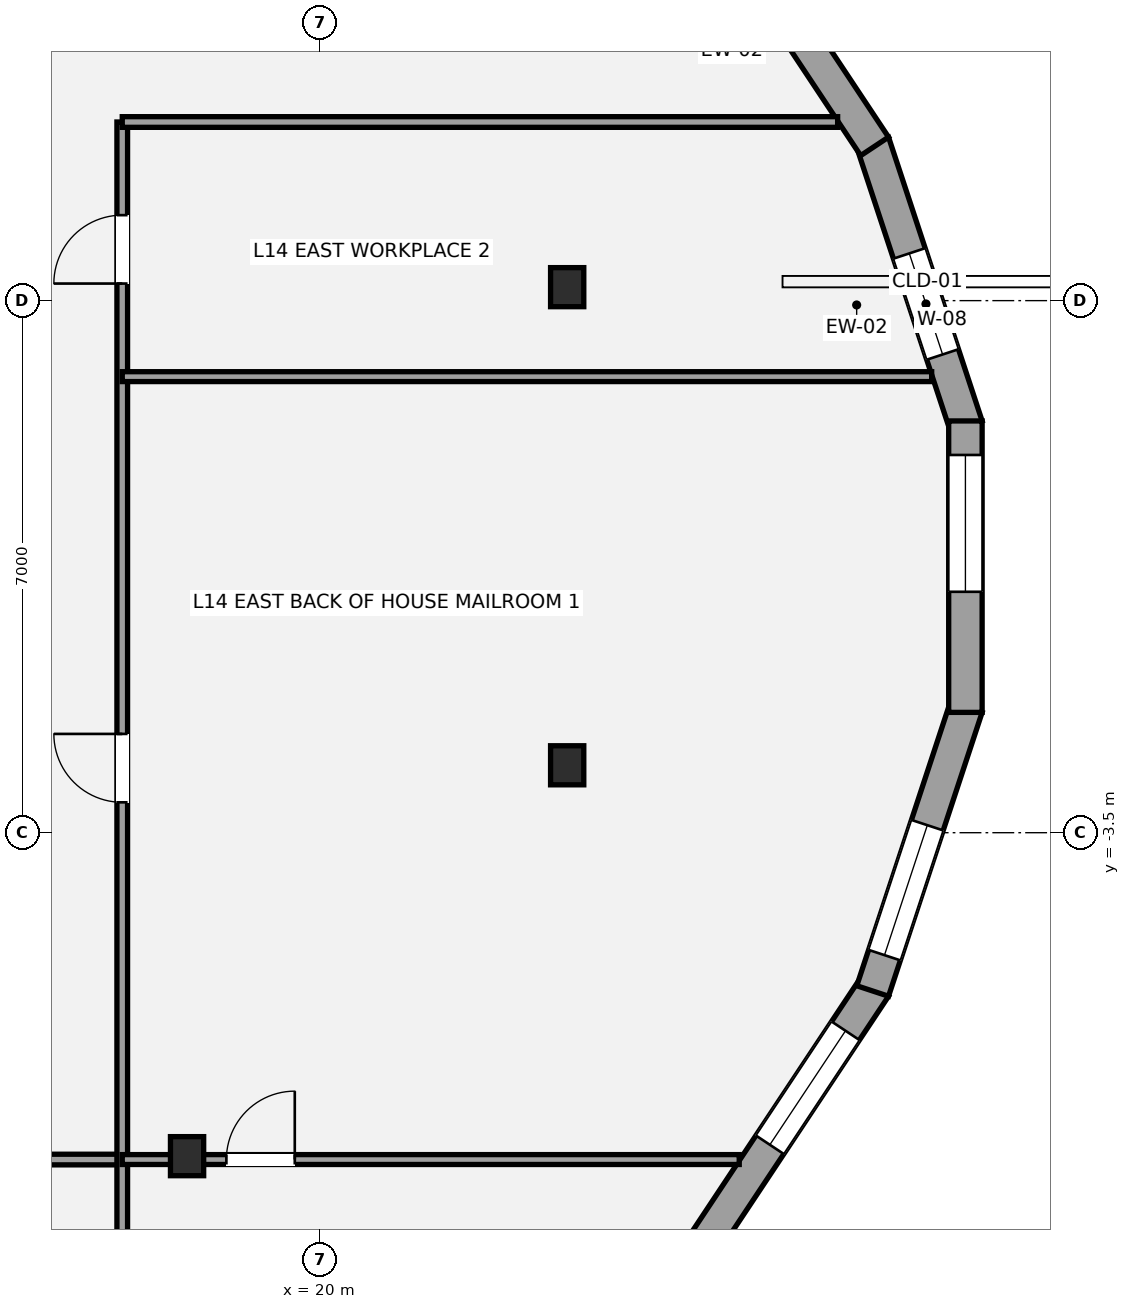
"""IFC4 building model, lengths in metres.
Left out: names, types, materials, properties, quantities, classifications, styles, units other than length and angle.
Written with IfcOpenShell. Run it as: python <this file> out.ifc"""

import sys

from ifc_helpers import new_model, si_unit, direction, frame, frame_2d, origin, origin_2d, place, context, subcontext, project, spatial, rectangle, i_section, extrude, element, fill, save


model = new_model("IFC4")
c1 = context("Model", 3, precision=1e-05, world=origin(), true_north=direction((0.0, 1.0)))
c2 = subcontext(c1, "Body", "Model", "MODEL_VIEW")
j1 = project(units=[si_unit("LENGTHUNIT", "METRE"), si_unit("PLANEANGLEUNIT", "RADIAN")], contexts=[c1])
p1 = place(None, origin())
s1 = spatial("IfcSite", under=j1, at=p1, CompositionType="ELEMENT")
p2 = place(p1, origin())
s2 = spatial("IfcBuilding", under=s1, at=p2, CompositionType="ELEMENT")
p3 = place(p2, frame((0.0, 0.0, 55.8)))
s3 = spatial("IfcBuildingStorey", under=s2, at=p3, CompositionType="ELEMENT", Elevation=55.8)
for number, where, z_axis, x_axis in (
    (1, (23.254, 3.677, 0.0), (0.0, 0.0, 1.0), (1.0, 0.0, 0.0)),
    (2, (18.253, -7.756, 0.0), (0.0, 0.0, 1.0), (1.0, 0.0, 0.0)),
    (3, (23.254, -2.613, 0.0), (0.0, 0.0, 1.0), (1.0, 0.0, 0.0)),
):
    element("IfcColumn", number, at=place(p3, frame(where, z_axis=z_axis, x_axis=x_axis)), inside=s3, PredefinedType="COLUMN", context=c2, shape_type="SweptSolid", body=[
        extrude(i_section(OverallWidth=0.437, OverallDepth=0.514, WebThickness=0.061, FlangeThickness=0.097, at=origin_2d()), origin(), (0.0, 0.0, 1.0), 3.6),
    ])
p4 = place(p3, frame((27.273, 5.583, 0.0), z_axis=(0.0, 0.0, 1.0), x_axis=(0.31317140165, -0.949696621658, 0.0)))
e4 = element("IfcWall", 4, at=p4, inside=s3, PredefinedType="STANDARD", context=c2, shape_type="SweptSolid", body=[
    extrude(rectangle(XDim=3.932, YDim=0.44, at=frame_2d((1.966, 0.0))), origin(), (0.0, 0.0, 1.0), 2.533),
])
p5 = place(p4, frame((1.539, 0.0, 0.85)))
e5 = element("IfcOpeningElement", 5, at=p5, cuts=e4, PredefinedType="OPENING", context=c2, shape_type="SweptSolid", body=[
    extrude(rectangle(XDim=1.4, YDim=1.55, at=frame_2d((0.7, 0.775))), frame((0.0, 0.23, 0.0), z_axis=(0.0, -1.0, 0.0), x_axis=(1.0, 0.0, 0.0)), (0.0, 0.0, 1.0), 0.46),
])
p6 = place(p3, frame((24.994, 9.001, 0.0), z_axis=(0.0, 0.0, 1.0), x_axis=(0.553144350008, -0.833085426625, 0.0)))
e6 = element("IfcWall", 6, at=p6, inside=s3, PredefinedType="STANDARD", context=c2, shape_type="SweptSolid", body=[
    extrude(rectangle(XDim=4.167, YDim=0.44, at=frame_2d((2.083, 0.0))), origin(), (0.0, 0.0, 1.0), 2.529),
])
p7 = place(p6, frame((0.595, 0.0, 0.58)))
e7 = element("IfcOpeningElement", 7, at=p7, cuts=e6, PredefinedType="OPENING", context=c2, shape_type="SweptSolid", body=[
    extrude(rectangle(XDim=0.9, YDim=1.35, at=frame_2d((0.45, 0.675))), frame((0.0, 0.23, 0.0), z_axis=(0.0, -1.0, 0.0), x_axis=(1.0, 0.0, 0.0)), (0.0, 0.0, 1.0), 0.46),
])
p8 = place(p3, frame((27.299, -5.53, 0.0), z_axis=(0.0, 0.0, 1.0), x_axis=(-0.553144350008, -0.833085426625, 0.0)))
e8 = element("IfcWall", 8, at=p8, inside=s3, PredefinedType="STANDARD", context=c2, shape_type="SweptSolid", body=[
    extrude(rectangle(XDim=4.167, YDim=0.44, at=frame_2d((2.083, 0.0))), origin(), (0.0, 0.0, 1.0), 2.529),
])
p9 = place(p8, frame((0.692, 0.0, 0.65)))
e9 = element("IfcOpeningElement", 9, at=p9, cuts=e8, PredefinedType="OPENING", context=c2, shape_type="SweptSolid", body=[
    extrude(rectangle(XDim=1.8, YDim=1.7, at=frame_2d((0.9, 0.85))), frame((0.0, 0.23, 0.0), z_axis=(0.0, -1.0, 0.0), x_axis=(1.0, 0.0, 0.0)), (0.0, 0.0, 1.0), 0.46),
])
p10 = place(p3, frame((28.505, -1.848, 0.0), z_axis=(0.0, 0.0, 1.0), x_axis=(-0.31317140165, -0.949696621658, 0.0)))
e10 = element("IfcWall", 10, at=p10, inside=s3, PredefinedType="STANDARD", context=c2, shape_type="SweptSolid", body=[
    extrude(rectangle(XDim=3.932, YDim=0.44, at=frame_2d((1.966, 0.0))), origin(), (0.0, 0.0, 1.0), 2.533),
])
p11 = place(p10, frame((1.635, 0.0, 0.65)))
e11 = element("IfcOpeningElement", 11, at=p11, cuts=e10, PredefinedType="OPENING", context=c2, shape_type="SweptSolid", body=[
    extrude(rectangle(XDim=1.8, YDim=1.7, at=frame_2d((0.9, 0.85))), frame((0.0, 0.23, 0.0), z_axis=(0.0, -1.0, 0.0), x_axis=(1.0, 0.0, 0.0)), (0.0, 0.0, 1.0), 0.46),
])
p12 = place(p3, frame((28.494, 1.917, 0.0), z_axis=(0.0, 0.0, 1.0), x_axis=(0.0, -1.0, 0.0)))
e12 = element("IfcWall", 12, at=p12, inside=s3, PredefinedType="STANDARD", context=c2, shape_type="SweptSolid", body=[
    extrude(rectangle(XDim=3.834, YDim=0.44, at=frame_2d((1.917, 0.0))), origin(), (0.0, 0.0, 1.0), 2.533),
])
p13 = place(p12, frame((0.448, 0.0, 0.65)))
e13 = element("IfcOpeningElement", 13, at=p13, cuts=e12, PredefinedType="OPENING", context=c2, shape_type="SweptSolid", body=[
    extrude(rectangle(XDim=1.8, YDim=1.7, at=frame_2d((0.9, 0.85))), frame((0.0, 0.23, 0.0), z_axis=(0.0, -1.0, 0.0), x_axis=(1.0, 0.0, 0.0)), (0.0, 0.0, 1.0), 0.46),
])
p14 = place(p3, frame((-17.4, -7.8, 0.0), z_axis=(0.0, 0.0, 1.0), x_axis=(1.0, 0.0, 0.0)))
e14 = element("IfcWall", 14, at=p14, inside=s3, PredefinedType="PARTITIONING", context=c2, shape_type="SweptSolid", body=[
    extrude(rectangle(XDim=34.8, YDim=0.14, at=frame_2d((17.4, 0.0))), origin(), (0.0, 0.0, 1.0), 2.779),
])
p15 = place(p14, frame((3.5, 0.0, 0.0)))
e15 = element("IfcOpeningElement", 15, at=p15, cuts=e14, PredefinedType="OPENING", context=c2, shape_type="SweptSolid", body=[
    extrude(rectangle(XDim=0.9, YDim=2.1, at=frame_2d((0.45, 1.05))), frame((0.0, 0.08, 0.0), z_axis=(0.0, -1.0, 0.0), x_axis=(1.0, 0.0, 0.0)), (0.0, 0.0, 1.0), 0.16),
])
p16 = place(p14, frame((10.95, 0.0, 0.0)))
e16 = element("IfcOpeningElement", 16, at=p16, cuts=e14, PredefinedType="OPENING", context=c2, shape_type="SweptSolid", body=[
    extrude(rectangle(XDim=0.9, YDim=2.1, at=frame_2d((0.45, 1.05))), frame((0.0, 0.08, 0.0), z_axis=(0.0, -1.0, 0.0), x_axis=(1.0, 0.0, 0.0)), (0.0, 0.0, 1.0), 0.16),
])
p17 = place(p14, frame((17.95, 0.0, 0.0)))
e17 = element("IfcOpeningElement", 17, at=p17, cuts=e14, PredefinedType="OPENING", context=c2, shape_type="SweptSolid", body=[
    extrude(rectangle(XDim=0.9, YDim=2.1, at=frame_2d((0.45, 1.05))), frame((0.0, 0.08, 0.0), z_axis=(0.0, -1.0, 0.0), x_axis=(1.0, 0.0, 0.0)), (0.0, 0.0, 1.0), 0.16),
])
p18 = place(p14, frame((24.45, 0.0, 0.0)))
e18 = element("IfcOpeningElement", 18, at=p18, cuts=e14, PredefinedType="OPENING", context=c2, shape_type="SweptSolid", body=[
    extrude(rectangle(XDim=0.9, YDim=2.1, at=frame_2d((0.45, 1.05))), frame((0.0, 0.08, 0.0), z_axis=(0.0, -1.0, 0.0), x_axis=(1.0, 0.0, 0.0)), (0.0, 0.0, 1.0), 0.16),
])
p19 = place(p14, frame((30.9, 0.0, 0.0)))
e19 = element("IfcOpeningElement", 19, at=p19, cuts=e14, PredefinedType="OPENING", context=c2, shape_type="SweptSolid", body=[
    extrude(rectangle(XDim=0.9, YDim=2.1, at=frame_2d((0.45, 1.05))), frame((0.0, 0.08, 0.0), z_axis=(0.0, -1.0, 0.0), x_axis=(1.0, 0.0, 0.0)), (0.0, 0.0, 1.0), 0.16),
])
p20 = place(p3, frame((17.4, -14.692, 0.0), z_axis=(0.0, 0.0, 1.0), x_axis=(0.0, 1.0, 0.0)))
e20 = element("IfcWall", 20, at=p20, inside=s3, PredefinedType="PARTITIONING", context=c2, shape_type="SweptSolid", body=[
    extrude(rectangle(XDim=20.542, YDim=0.14, at=frame_2d((10.271, 0.0))), origin(), (0.0, 0.0, 1.0), 2.841),
])
p21 = place(p20, frame((11.591, 0.0, 0.0)))
e21 = element("IfcOpeningElement", 21, at=p21, cuts=e20, PredefinedType="OPENING", context=c2, shape_type="SweptSolid", body=[
    extrude(rectangle(XDim=0.9, YDim=2.1, at=frame_2d((0.45, 1.05))), frame((0.0, 0.08, 0.0), z_axis=(0.0, -1.0, 0.0), x_axis=(1.0, 0.0, 0.0)), (0.0, 0.0, 1.0), 0.16),
])
p22 = place(p20, frame((18.417, 0.0, 0.0)))
e22 = element("IfcOpeningElement", 22, at=p22, cuts=e20, PredefinedType="OPENING", context=c2, shape_type="SweptSolid", body=[
    extrude(rectangle(XDim=0.9, YDim=2.1, at=frame_2d((0.45, 1.05))), frame((0.0, 0.08, 0.0), z_axis=(0.0, -1.0, 0.0), x_axis=(1.0, 0.0, 0.0)), (0.0, 0.0, 1.0), 0.16),
])
p23 = place(p3, frame((17.4, 5.85, 0.0), z_axis=(0.0, 0.0, 1.0), x_axis=(1.0, 0.0, 0.0)))
e23 = element("IfcWall", 23, at=p23, inside=s3, PredefinedType="PARTITIONING", context=c2, shape_type="SweptSolid", body=[
    extrude(rectangle(XDim=9.413, YDim=0.14, at=frame_2d((4.706, 0.0))), origin(), (0.0, 0.0, 1.0), 2.853),
])
p24 = place(p3, frame((17.4, -7.8, 0.0), z_axis=(0.0, 0.0, 1.0), x_axis=(1.0, 0.0, 0.0)))
e24 = element("IfcWall", 24, at=p24, inside=s3, PredefinedType="PARTITIONING", context=c2, shape_type="SweptSolid", body=[
    extrude(rectangle(XDim=8.118, YDim=0.13, at=frame_2d((4.059, 0.0))), origin(), (0.0, 0.0, 1.0), 2.779),
])
p25 = place(p24, frame((1.37, 0.0, 0.0)))
e25 = element("IfcOpeningElement", 25, at=p25, cuts=e24, PredefinedType="OPENING", context=c2, shape_type="SweptSolid", body=[
    extrude(rectangle(XDim=0.9, YDim=2.1, at=frame_2d((0.45, 1.05))), frame((0.0, 0.075, 0.0), z_axis=(0.0, -1.0, 0.0), x_axis=(1.0, 0.0, 0.0)), (0.0, 0.0, 1.0), 0.15),
])
p26 = place(p3, frame((17.4, 2.5, 0.0), z_axis=(0.0, 0.0, 1.0), x_axis=(1.0, 0.0, 0.0)))
e26 = element("IfcWall", 26, at=p26, inside=s3, PredefinedType="PARTITIONING", context=c2, shape_type="SweptSolid", body=[
    extrude(rectangle(XDim=10.65, YDim=0.13, at=frame_2d((5.325, 0.0))), origin(), (0.0, 0.0, 1.0), 2.841),
])
p27 = place(p5, origin())
e27 = element("IfcWindow", 27, at=p27, inside=s3, PartitioningType="SINGLE_PANEL", PredefinedType="WINDOW", context=c2, shape_type="SweptSolid", body=[
    extrude(rectangle(XDim=1.4, YDim=1.55, at=frame_2d((0.7, 0.775))), frame((0.0, -0.01, 0.0), z_axis=(0.0, -1.0, 0.0), x_axis=(1.0, 0.0, 0.0)), (0.0, 0.0, 1.0), 0.06),
])
fill(e5, e27)
p28 = place(p9, origin())
e28 = element("IfcWindow", 28, at=p28, inside=s3, PartitioningType="SINGLE_PANEL", PredefinedType="WINDOW", context=c2, shape_type="SweptSolid", body=[
    extrude(rectangle(XDim=1.8, YDim=1.7, at=frame_2d((0.9, 0.85))), frame((0.0, -0.01, 0.0), z_axis=(0.0, -1.0, 0.0), x_axis=(1.0, 0.0, 0.0)), (0.0, 0.0, 1.0), 0.06),
])
fill(e9, e28)
p29 = place(p11, origin())
e29 = element("IfcWindow", 29, at=p29, inside=s3, PartitioningType="SINGLE_PANEL", PredefinedType="WINDOW", context=c2, shape_type="SweptSolid", body=[
    extrude(rectangle(XDim=1.8, YDim=1.7, at=frame_2d((0.9, 0.85))), frame((0.0, -0.01, 0.0), z_axis=(0.0, -1.0, 0.0), x_axis=(1.0, 0.0, 0.0)), (0.0, 0.0, 1.0), 0.06),
])
fill(e11, e29)
p30 = place(p13, origin())
e30 = element("IfcWindow", 30, at=p30, inside=s3, PartitioningType="SINGLE_PANEL", PredefinedType="WINDOW", context=c2, shape_type="SweptSolid", body=[
    extrude(rectangle(XDim=1.8, YDim=1.7, at=frame_2d((0.9, 0.85))), frame((0.0, -0.01, 0.0), z_axis=(0.0, -1.0, 0.0), x_axis=(1.0, 0.0, 0.0)), (0.0, 0.0, 1.0), 0.06),
])
fill(e13, e30)
p31 = place(p25, origin())
e31 = element("IfcDoor", 31, at=p31, inside=s3, OperationType="SINGLE_SWING_RIGHT", PredefinedType="DOOR", context=c2, shape_type="SweptSolid", body=[
    extrude(rectangle(XDim=0.9, YDim=2.1, at=frame_2d((0.45, 1.05))), frame((0.0, 0.025, 0.0), z_axis=(0.0, -1.0, 0.0), x_axis=(1.0, 0.0, 0.0)), (0.0, 0.0, 1.0), 0.05),
])
fill(e25, e31)
p32 = place(p21, origin())
e32 = element("IfcDoor", 32, at=p32, inside=s3, OperationType="SINGLE_SWING_RIGHT", PredefinedType="DOOR", context=c2, shape_type="SweptSolid", body=[
    extrude(rectangle(XDim=0.9, YDim=2.1, at=frame_2d((0.45, 1.05))), frame((0.0, 0.025, 0.0), z_axis=(0.0, -1.0, 0.0), x_axis=(1.0, 0.0, 0.0)), (0.0, 0.0, 1.0), 0.05),
])
fill(e21, e32)
p33 = place(p22, origin())
e33 = element("IfcDoor", 33, at=p33, inside=s3, OperationType="SINGLE_SWING_LEFT", PredefinedType="DOOR", context=c2, shape_type="SweptSolid", body=[
    extrude(rectangle(XDim=0.9, YDim=2.1, at=frame_2d((0.45, 1.05))), frame((0.0, 0.025, 0.0), z_axis=(0.0, -1.0, 0.0), x_axis=(1.0, 0.0, 0.0)), (0.0, 0.0, 1.0), 0.05),
])
fill(e22, e33)
save(model, sys.argv[1])
